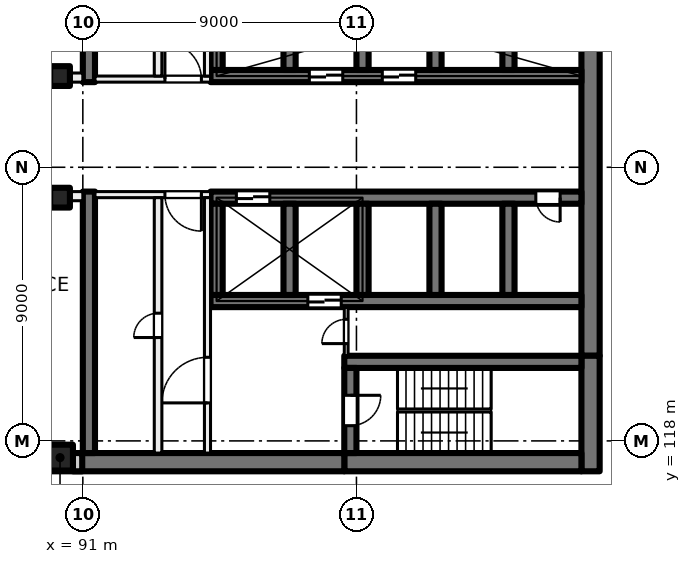
"""IFC4 building model, lengths in metres.
Left out: names, types, materials, properties, quantities, classifications, styles, units other than length and angle.
Written with IfcOpenShell. Run it as: python <this file> out.ifc"""

import sys

from ifc_helpers import new_model, si_unit, direction, frame, frame_2d, origin, origin_2d, place, context, subcontext, project, spatial, rectangle, extrude, element, fill, save


model = new_model("IFC4")
c1 = context("Model", 3, precision=1e-05, world=origin(), true_north=direction((0.0, 1.0)))
c2 = subcontext(c1, "Body", "Model", "MODEL_VIEW")
j1 = project(units=[si_unit("LENGTHUNIT", "METRE"), si_unit("PLANEANGLEUNIT", "RADIAN")], contexts=[c1])
p1 = place(None, origin())
s1 = spatial("IfcSite", under=j1, at=p1, CompositionType="ELEMENT")
p2 = place(p1, origin())
s2 = spatial("IfcBuilding", under=s1, at=p2, CompositionType="ELEMENT")
p3 = place(p2, frame((0.0, 0.0, 85.0)))
s3 = spatial("IfcBuildingStorey", under=s2, at=p3, CompositionType="ELEMENT", Elevation=85.0)
for number, where, z_axis, x_axis in (
    (1, (90.25, 130.0, 0.0), (0.0, 0.0, 1.0), (1.0, 0.0, 0.0)),
    (2, (90.25, 126.0, 0.0), (0.0, 0.0, 1.0), (1.0, 0.0, 0.0)),
):
    element("IfcColumn", number, at=place(p3, frame(where, z_axis=z_axis, x_axis=x_axis)), inside=s3, PredefinedType="COLUMN", context=c2, shape_type="SweptSolid", body=[
        extrude(rectangle(XDim=0.65, YDim=0.65, at=origin_2d()), origin(), (0.0, 0.0, 1.0), 4.0),
    ])
p4 = place(p3, frame((90.25, 117.45, 0.0), z_axis=(0.0, 0.0, 1.0), x_axis=(1.0, 0.0, 0.0)))
e3 = element("IfcColumn", 3, at=p4, inside=s3, PredefinedType="COLUMN", context=c2, shape_type="SweptSolid", body=[
    extrude(rectangle(XDim=0.85, YDim=0.85, at=origin_2d()), origin(), (0.0, 0.0, 1.0), 4.0),
])
p5 = place(p3, frame((107.7, 135.2, 0.0), z_axis=(0.0, 0.0, 1.0), x_axis=(0.0, -1.0, 0.0)))
e4 = element("IfcWall", 4, at=p5, inside=s3, PredefinedType="SHEAR", context=c2, shape_type="SweptSolid", body=[
    extrude(rectangle(XDim=14.4, YDim=0.6, at=frame_2d((7.2, 0.0))), origin(), (0.0, 0.0, 1.0), 4.0),
])
p6 = place(p3, frame((107.7, 120.8, 0.0), z_axis=(0.0, 0.0, 1.0), x_axis=(0.0, -1.0, 0.0)))
e5 = element("IfcWall", 5, at=p6, inside=s3, PredefinedType="SHEAR", context=c2, shape_type="SweptSolid", body=[
    extrude(rectangle(XDim=3.8, YDim=0.6, at=frame_2d((1.9, 0.0))), origin(), (0.0, 0.0, 1.0), 4.0),
])
p7 = place(p3, frame((107.4, 117.3, 0.0), z_axis=(0.0, 0.0, 1.0), x_axis=(-1.0, 0.0, 0.0)))
e6 = element("IfcWall", 6, at=p7, inside=s3, PredefinedType="SHEAR", context=c2, shape_type="SweptSolid", body=[
    extrude(rectangle(XDim=7.8, YDim=0.6, at=frame_2d((3.9, 0.0))), origin(), (0.0, 0.0, 1.0), 4.0),
])
p8 = place(p3, frame((99.6, 117.3, 0.0), z_axis=(0.0, 0.0, 1.0), x_axis=(-1.0, 0.0, 0.0)))
e7 = element("IfcWall", 7, at=p8, inside=s3, PredefinedType="SHEAR", context=c2, shape_type="SweptSolid", body=[
    extrude(rectangle(XDim=8.925, YDim=0.6, at=frame_2d((4.462, 0.0))), origin(), (0.0, 0.0, 1.0), 4.0),
])
p9 = place(p3, frame((107.4, 120.6, 0.0), z_axis=(0.0, 0.0, 1.0), x_axis=(-1.0, 0.0, 0.0)))
e8 = element("IfcWall", 8, at=p9, inside=s3, PredefinedType="SHEAR", context=c2, shape_type="SweptSolid", body=[
    extrude(rectangle(XDim=7.8, YDim=0.4, at=frame_2d((3.9, 0.0))), origin(), (0.0, 0.0, 1.0), 4.0),
])
p10 = place(p3, frame((99.8, 120.4, 0.0), z_axis=(0.0, 0.0, 1.0), x_axis=(0.0, -1.0, 0.0)))
e9 = element("IfcWall", 9, at=p10, inside=s3, PredefinedType="SHEAR", context=c2, shape_type="SweptSolid", body=[
    extrude(rectangle(XDim=2.8, YDim=0.4, at=frame_2d((1.4, 0.0))), origin(), (0.0, 0.0, 1.0), 4.0),
])
p11 = place(p10, frame((0.9, 0.0, 0.0)))
e10 = element("IfcOpeningElement", 10, at=p11, cuts=e9, PredefinedType="OPENING", context=c2, shape_type="SweptSolid", body=[
    extrude(rectangle(XDim=1.0, YDim=2.1, at=frame_2d((0.5, 1.05))), frame((0.0, 0.21, 0.0), z_axis=(0.0, -1.0, 0.0), x_axis=(1.0, 0.0, 0.0)), (0.0, 0.0, 1.0), 0.42),
])
p12 = place(p3, frame((107.4, 130.0, 0.0), z_axis=(0.0, 0.0, 1.0), x_axis=(-1.0, 0.0, 0.0)))
e11 = element("IfcWall", 11, at=p12, inside=s3, PredefinedType="SHEAR", context=c2, shape_type="SweptSolid", body=[
    extrude(rectangle(XDim=12.2, YDim=0.4, at=frame_2d((6.1, 0.0))), origin(), (0.0, 0.0, 1.0), 4.0),
])
p13 = place(p12, frame((5.45, 0.0, 0.0)))
e12 = element("IfcOpeningElement", 12, at=p13, cuts=e11, PredefinedType="OPENING", context=c2, shape_type="SweptSolid", body=[
    extrude(rectangle(XDim=1.1, YDim=2.1, at=frame_2d((0.55, 1.05))), frame((0.0, 0.21, 0.0), z_axis=(0.0, -1.0, 0.0), x_axis=(1.0, 0.0, 0.0)), (0.0, 0.0, 1.0), 0.42),
])
p14 = place(p12, frame((7.85, 0.0, 0.0)))
e13 = element("IfcOpeningElement", 13, at=p14, cuts=e11, PredefinedType="OPENING", context=c2, shape_type="SweptSolid", body=[
    extrude(rectangle(XDim=1.1, YDim=2.1, at=frame_2d((0.55, 1.05))), frame((0.0, 0.21, 0.0), z_axis=(0.0, -1.0, 0.0), x_axis=(1.0, 0.0, 0.0)), (0.0, 0.0, 1.0), 0.42),
])
for number, where, z_axis, x_axis in (
    (14, (105.0, 133.2, 0.0), (0.0, 0.0, 1.0), (0.0, -1.0, 0.0)),
    (15, (102.6, 133.2, 0.0), (0.0, 0.0, 1.0), (0.0, -1.0, 0.0)),
    (16, (100.2, 133.2, 0.0), (0.0, 0.0, 1.0), (0.0, -1.0, 0.0)),
    (17, (97.8, 133.2, 0.0), (0.0, 0.0, 1.0), (0.0, -1.0, 0.0)),
    (18, (95.4, 133.2, 0.0), (0.0, 0.0, 1.0), (0.0, -1.0, 0.0)),
):
    element("IfcWall", number, at=place(p3, frame(where, z_axis=z_axis, x_axis=x_axis)), inside=s3, PredefinedType="SHEAR", context=c2, shape_type="SweptSolid", body=[
        extrude(rectangle(XDim=3.0, YDim=0.4, at=frame_2d((1.5, 0.0))), origin(), (0.0, 0.0, 1.0), 4.0),
    ])
p15 = place(p3, frame((107.4, 126.0, 0.0), z_axis=(0.0, 0.0, 1.0), x_axis=(-1.0, 0.0, 0.0)))
e19 = element("IfcWall", 19, at=p15, inside=s3, PredefinedType="SHEAR", context=c2, shape_type="SweptSolid", body=[
    extrude(rectangle(XDim=12.2, YDim=0.4, at=frame_2d((6.1, 0.0))), origin(), (0.0, 0.0, 1.0), 4.0),
])
p16 = place(p15, frame((10.25, 0.0, 0.0)))
e20 = element("IfcOpeningElement", 20, at=p16, cuts=e19, PredefinedType="OPENING", context=c2, shape_type="SweptSolid", body=[
    extrude(rectangle(XDim=1.1, YDim=2.1, at=frame_2d((0.55, 1.05))), frame((0.0, 0.21, 0.0), z_axis=(0.0, -1.0, 0.0), x_axis=(1.0, 0.0, 0.0)), (0.0, 0.0, 1.0), 0.42),
])
p17 = place(p15, frame((0.7, 0.0, 0.0)))
e21 = element("IfcOpeningElement", 21, at=p17, cuts=e19, PredefinedType="OPENING", context=c2, shape_type="SweptSolid", body=[
    extrude(rectangle(XDim=0.8, YDim=2.1, at=frame_2d((0.4, 1.05))), frame((0.0, 0.21, 0.0), z_axis=(0.0, -1.0, 0.0), x_axis=(1.0, 0.0, 0.0)), (0.0, 0.0, 1.0), 0.42),
])
p18 = place(p3, frame((107.4, 122.6, 0.0), z_axis=(0.0, 0.0, 1.0), x_axis=(-1.0, 0.0, 0.0)))
e22 = element("IfcWall", 22, at=p18, inside=s3, PredefinedType="SHEAR", context=c2, shape_type="SweptSolid", body=[
    extrude(rectangle(XDim=12.2, YDim=0.4, at=frame_2d((6.1, 0.0))), origin(), (0.0, 0.0, 1.0), 4.0),
])
p19 = place(p18, frame((7.9, 0.0, 0.0)))
e23 = element("IfcOpeningElement", 23, at=p19, cuts=e22, PredefinedType="OPENING", context=c2, shape_type="SweptSolid", body=[
    extrude(rectangle(XDim=1.1, YDim=2.1, at=frame_2d((0.55, 1.05))), frame((0.0, 0.21, 0.0), z_axis=(0.0, -1.0, 0.0), x_axis=(1.0, 0.0, 0.0)), (0.0, 0.0, 1.0), 0.42),
])
for number, where, z_axis, x_axis in (
    (24, (105.0, 125.8, 0.0), (0.0, 0.0, 1.0), (0.0, -1.0, 0.0)),
    (25, (102.6, 125.8, 0.0), (0.0, 0.0, 1.0), (0.0, -1.0, 0.0)),
    (26, (100.2, 125.8, 0.0), (0.0, 0.0, 1.0), (0.0, -1.0, 0.0)),
    (27, (97.8, 125.8, 0.0), (0.0, 0.0, 1.0), (0.0, -1.0, 0.0)),
    (28, (95.4, 125.8, 0.0), (0.0, 0.0, 1.0), (0.0, -1.0, 0.0)),
):
    element("IfcWall", number, at=place(p3, frame(where, z_axis=z_axis, x_axis=x_axis)), inside=s3, PredefinedType="SHEAR", context=c2, shape_type="SweptSolid", body=[
        extrude(rectangle(XDim=3.0, YDim=0.4, at=frame_2d((1.5, 0.0))), origin(), (0.0, 0.0, 1.0), 4.0),
    ])
for number, where, z_axis, x_axis in (
    (29, (91.2, 138.4, 0.0), (0.0, 0.0, 1.0), (0.0, -1.0, 0.0)),
    (30, (91.2, 126.2, 0.0), (0.0, 0.0, 1.0), (0.0, -1.0, 0.0)),
):
    element("IfcWall", number, at=place(p3, frame(where, z_axis=z_axis, x_axis=x_axis)), inside=s3, PredefinedType="SHEAR", context=c2, shape_type="SweptSolid", body=[
        extrude(rectangle(XDim=8.6, YDim=0.4, at=frame_2d((4.3, 0.0))), origin(), (0.0, 0.0, 1.0), 4.0),
    ])
p20 = place(p3, frame((90.98, 117.3, 0.0), z_axis=(0.0, 0.0, 1.0), x_axis=(-1.0, 0.0, 0.0)))
e31 = element("IfcWall", 31, at=p20, inside=s3, PredefinedType="SOLIDWALL", context=c2, shape_type="SweptSolid", body=[
    extrude(rectangle(XDim=33.745, YDim=0.6, at=frame_2d((16.873, 0.0))), origin(), (0.0, 0.0, 1.0), 3.625),
])
p21 = place(p20, frame((1.48, 0.0, 0.9)))
e32 = element("IfcOpeningElement", 32, at=p21, cuts=e31, PredefinedType="OPENING", context=c2, shape_type="SweptSolid", body=[
    extrude(rectangle(XDim=3.0, YDim=2.4, at=frame_2d((1.5, 1.2))), frame((0.0, 0.31, 0.0), z_axis=(0.0, -1.0, 0.0), x_axis=(1.0, 0.0, 0.0)), (0.0, 0.0, 1.0), 0.62),
])
p22 = place(p20, frame((5.98, 0.0, 0.9)))
e33 = element("IfcOpeningElement", 33, at=p22, cuts=e31, PredefinedType="OPENING", context=c2, shape_type="SweptSolid", body=[
    extrude(rectangle(XDim=3.0, YDim=2.4, at=frame_2d((1.5, 1.2))), frame((0.0, 0.31, 0.0), z_axis=(0.0, -1.0, 0.0), x_axis=(1.0, 0.0, 0.0)), (0.0, 0.0, 1.0), 0.62),
])
p23 = place(p20, frame((10.48, 0.0, 0.9)))
e34 = element("IfcOpeningElement", 34, at=p23, cuts=e31, PredefinedType="OPENING", context=c2, shape_type="SweptSolid", body=[
    extrude(rectangle(XDim=3.0, YDim=2.4, at=frame_2d((1.5, 1.2))), frame((0.0, 0.31, 0.0), z_axis=(0.0, -1.0, 0.0), x_axis=(1.0, 0.0, 0.0)), (0.0, 0.0, 1.0), 0.62),
])
p24 = place(p20, frame((14.98, 0.0, 0.9)))
e35 = element("IfcOpeningElement", 35, at=p24, cuts=e31, PredefinedType="OPENING", context=c2, shape_type="SweptSolid", body=[
    extrude(rectangle(XDim=3.0, YDim=2.4, at=frame_2d((1.5, 1.2))), frame((0.0, 0.31, 0.0), z_axis=(0.0, -1.0, 0.0), x_axis=(1.0, 0.0, 0.0)), (0.0, 0.0, 1.0), 0.62),
])
p25 = place(p20, frame((19.48, 0.0, 0.9)))
e36 = element("IfcOpeningElement", 36, at=p25, cuts=e31, PredefinedType="OPENING", context=c2, shape_type="SweptSolid", body=[
    extrude(rectangle(XDim=3.0, YDim=2.4, at=frame_2d((1.5, 1.2))), frame((0.0, 0.31, 0.0), z_axis=(0.0, -1.0, 0.0), x_axis=(1.0, 0.0, 0.0)), (0.0, 0.0, 1.0), 0.62),
])
p26 = place(p20, frame((23.98, 0.0, 0.9)))
e37 = element("IfcOpeningElement", 37, at=p26, cuts=e31, PredefinedType="OPENING", context=c2, shape_type="SweptSolid", body=[
    extrude(rectangle(XDim=3.0, YDim=2.4, at=frame_2d((1.5, 1.2))), frame((0.0, 0.31, 0.0), z_axis=(0.0, -1.0, 0.0), x_axis=(1.0, 0.0, 0.0)), (0.0, 0.0, 1.0), 0.62),
])
p27 = place(p20, frame((28.48, 0.0, 0.9)))
e38 = element("IfcOpeningElement", 38, at=p27, cuts=e31, PredefinedType="OPENING", context=c2, shape_type="SweptSolid", body=[
    extrude(rectangle(XDim=3.0, YDim=2.4, at=frame_2d((1.5, 1.2))), frame((0.0, 0.31, 0.0), z_axis=(0.0, -1.0, 0.0), x_axis=(1.0, 0.0, 0.0)), (0.0, 0.0, 1.0), 0.62),
])
p28 = place(p3, frame((95.2, 126.1, 0.0), z_axis=(0.0, 0.0, 1.0), x_axis=(-1.0, 0.0, 0.0)))
e39 = element("IfcWall", 39, at=p28, inside=s3, PredefinedType="PARTITIONING", context=c2, shape_type="SweptSolid", body=[
    extrude(rectangle(XDim=3.8, YDim=0.2, at=frame_2d((1.9, 0.0))), origin(), (0.0, 0.0, 1.0), 3.625),
])
p29 = place(p28, frame((0.3, 0.0, 0.0)))
e40 = element("IfcOpeningElement", 40, at=p29, cuts=e39, PredefinedType="OPENING", context=c2, shape_type="SweptSolid", body=[
    extrude(rectangle(XDim=1.2, YDim=2.1, at=frame_2d((0.6, 1.05))), frame((0.0, 0.11, 0.0), z_axis=(0.0, -1.0, 0.0), x_axis=(1.0, 0.0, 0.0)), (0.0, 0.0, 1.0), 0.22),
])
p30 = place(p3, frame((95.1, 117.6, 0.0), z_axis=(0.0, 0.0, 1.0), x_axis=(0.0, 1.0, 0.0)))
e41 = element("IfcWall", 41, at=p30, inside=s3, PredefinedType="PARTITIONING", context=c2, shape_type="SweptSolid", body=[
    extrude(rectangle(XDim=8.4, YDim=0.2, at=frame_2d((4.2, 0.0))), origin(), (0.0, 0.0, 1.0), 3.625),
])
p31 = place(p30, frame((1.65, 0.0, 0.0)))
e42 = element("IfcOpeningElement", 42, at=p31, cuts=e41, PredefinedType="OPENING", context=c2, shape_type="SweptSolid", body=[
    extrude(rectangle(XDim=1.5, YDim=2.1, at=frame_2d((0.75, 1.05))), frame((0.0, 0.11, 0.0), z_axis=(0.0, -1.0, 0.0), x_axis=(1.0, 0.0, 0.0)), (0.0, 0.0, 1.0), 0.22),
])
p32 = place(p3, frame((93.475, 117.6, 0.0), z_axis=(0.0, 0.0, 1.0), x_axis=(0.0, 1.0, 0.0)))
e43 = element("IfcWall", 43, at=p32, inside=s3, PredefinedType="PARTITIONING", context=c2, shape_type="SweptSolid", body=[
    extrude(rectangle(XDim=8.4, YDim=0.25, at=frame_2d((4.2, 0.0))), origin(), (0.0, 0.0, 1.0), 3.625),
])
p33 = place(p32, frame((3.8, 0.0, 0.0)))
e44 = element("IfcOpeningElement", 44, at=p33, cuts=e43, PredefinedType="OPENING", context=c2, shape_type="SweptSolid", body=[
    extrude(rectangle(XDim=0.8, YDim=2.1, at=frame_2d((0.4, 1.05))), frame((0.0, 0.135, 0.0), z_axis=(0.0, -1.0, 0.0), x_axis=(1.0, 0.0, 0.0)), (0.0, 0.0, 1.0), 0.27),
])
p34 = place(p3, frame((99.663, 120.8, 0.0), z_axis=(0.0, 0.0, 1.0), x_axis=(0.0, 1.0, 0.0)))
e45 = element("IfcWall", 45, at=p34, inside=s3, PredefinedType="PARTITIONING", context=c2, shape_type="SweptSolid", body=[
    extrude(rectangle(XDim=1.6, YDim=0.125, at=frame_2d((0.8, 0.0))), origin(), (0.0, 0.0, 1.0), 3.625),
])
p35 = place(p34, frame((0.4, 0.0, 0.0)))
e46 = element("IfcOpeningElement", 46, at=p35, cuts=e45, PredefinedType="OPENING", context=c2, shape_type="SweptSolid", body=[
    extrude(rectangle(XDim=0.8, YDim=2.1, at=frame_2d((0.4, 1.05))), frame((0.0, 0.073, 0.0), z_axis=(0.0, -1.0, 0.0), x_axis=(1.0, 0.0, 0.0)), (0.0, 0.0, 1.0), 0.145),
])
p36 = place(p3, frame((91.4, 129.9, 0.0), z_axis=(0.0, 0.0, 1.0), x_axis=(1.0, 0.0, 0.0)))
e47 = element("IfcWall", 47, at=p36, inside=s3, PredefinedType="PARTITIONING", context=c2, shape_type="SweptSolid", body=[
    extrude(rectangle(XDim=3.8, YDim=0.2, at=frame_2d((1.9, 0.0))), origin(), (0.0, 0.0, 1.0), 3.625),
])
p37 = place(p36, frame((2.3, 0.0, 0.0)))
e48 = element("IfcOpeningElement", 48, at=p37, cuts=e47, PredefinedType="OPENING", context=c2, shape_type="SweptSolid", body=[
    extrude(rectangle(XDim=1.2, YDim=2.1, at=frame_2d((0.6, 1.05))), frame((0.0, 0.11, 0.0), z_axis=(0.0, -1.0, 0.0), x_axis=(1.0, 0.0, 0.0)), (0.0, 0.0, 1.0), 0.22),
])
p38 = place(p3, frame((95.1, 130.0, 0.0), z_axis=(0.0, 0.0, 1.0), x_axis=(0.0, 1.0, 0.0)))
e49 = element("IfcWall", 49, at=p38, inside=s3, PredefinedType="PARTITIONING", context=c2, shape_type="SweptSolid", body=[
    extrude(rectangle(XDim=8.4, YDim=0.2, at=frame_2d((4.2, 0.0))), origin(), (0.0, 0.0, 1.0), 3.625),
])
p39 = place(p38, frame((5.25, 0.0, 0.0)))
e50 = element("IfcOpeningElement", 50, at=p39, cuts=e49, PredefinedType="OPENING", context=c2, shape_type="SweptSolid", body=[
    extrude(rectangle(XDim=1.5, YDim=2.1, at=frame_2d((0.75, 1.05))), frame((0.0, 0.11, 0.0), z_axis=(0.0, -1.0, 0.0), x_axis=(1.0, 0.0, 0.0)), (0.0, 0.0, 1.0), 0.22),
])
p40 = place(p3, frame((93.475, 130.0, 0.0), z_axis=(0.0, 0.0, 1.0), x_axis=(0.0, 1.0, 0.0)))
e51 = element("IfcWall", 51, at=p40, inside=s3, PredefinedType="PARTITIONING", context=c2, shape_type="SweptSolid", body=[
    extrude(rectangle(XDim=8.4, YDim=0.25, at=frame_2d((4.2, 0.0))), origin(), (0.0, 0.0, 1.0), 3.625),
])
p41 = place(p40, frame((3.8, 0.0, 0.0)))
e52 = element("IfcOpeningElement", 52, at=p41, cuts=e51, PredefinedType="OPENING", context=c2, shape_type="SweptSolid", body=[
    extrude(rectangle(XDim=0.8, YDim=2.1, at=frame_2d((0.4, 1.05))), frame((0.0, 0.135, 0.0), z_axis=(0.0, -1.0, 0.0), x_axis=(1.0, 0.0, 0.0)), (0.0, 0.0, 1.0), 0.27),
])
p42 = place(p3, frame((72.5, 129.95, 0.0), z_axis=(0.0, 0.0, 1.0), x_axis=(1.0, 0.0, 0.0)))
e53 = element("IfcWall", 53, at=p42, inside=s3, PredefinedType="PARTITIONING", context=c2, shape_type="SweptSolid", body=[
    extrude(rectangle(XDim=18.5, YDim=0.3, at=frame_2d((9.25, 0.0))), origin(), (0.0, 0.0, 1.0), 3.625),
])
p43 = place(p42, frame((9.35, 0.0, 0.0)))
e54 = element("IfcOpeningElement", 54, at=p43, cuts=e53, PredefinedType="OPENING", context=c2, shape_type="SweptSolid", body=[
    extrude(rectangle(XDim=1.8, YDim=2.1, at=frame_2d((0.9, 1.05))), frame((0.0, 0.16, 0.0), z_axis=(0.0, -1.0, 0.0), x_axis=(1.0, 0.0, 0.0)), (0.0, 0.0, 1.0), 0.32),
])
p44 = place(p3, frame((91.0, 126.05, 0.0), z_axis=(0.0, 0.0, 1.0), x_axis=(-1.0, 0.0, 0.0)))
e55 = element("IfcWall", 55, at=p44, inside=s3, PredefinedType="PARTITIONING", context=c2, shape_type="SweptSolid", body=[
    extrude(rectangle(XDim=43.785, YDim=0.3, at=frame_2d((21.893, 0.0))), origin(), (0.0, 0.0, 1.0), 3.625),
])
p45 = place(p44, frame((7.475, 0.0, 0.0)))
e56 = element("IfcOpeningElement", 56, at=p45, cuts=e55, PredefinedType="OPENING", context=c2, shape_type="SweptSolid", body=[
    extrude(rectangle(XDim=1.8, YDim=2.1, at=frame_2d((0.9, 1.05))), frame((0.0, 0.16, 0.0), z_axis=(0.0, -1.0, 0.0), x_axis=(1.0, 0.0, 0.0)), (0.0, 0.0, 1.0), 0.32),
])
p46 = place(p44, frame((34.0, 0.0, 0.0)))
e57 = element("IfcOpeningElement", 57, at=p46, cuts=e55, PredefinedType="OPENING", context=c2, shape_type="SweptSolid", body=[
    extrude(rectangle(XDim=1.0, YDim=2.1, at=frame_2d((0.5, 1.05))), frame((0.0, 0.16, 0.0), z_axis=(0.0, -1.0, 0.0), x_axis=(1.0, 0.0, 0.0)), (0.0, 0.0, 1.0), 0.32),
])
p47 = place(p44, frame((39.296, 0.0, 0.0)))
e58 = element("IfcOpeningElement", 58, at=p47, cuts=e55, PredefinedType="OPENING", context=c2, shape_type="SweptSolid", body=[
    extrude(rectangle(XDim=1.8, YDim=2.1, at=frame_2d((0.9, 1.05))), frame((0.0, 0.16, 0.0), z_axis=(0.0, -1.0, 0.0), x_axis=(1.0, 0.0, 0.0)), (0.0, 0.0, 1.0), 0.32),
])
p48 = place(p16, origin())
e59 = element("IfcDoor", 59, at=p48, inside=s3, OperationType="DOUBLE_DOOR_SLIDING", PredefinedType="DOOR", context=c2, shape_type="SweptSolid", body=[
    extrude(rectangle(XDim=1.1, YDim=2.1, at=frame_2d((0.55, 1.05))), frame((0.0, 0.025, 0.0), z_axis=(0.0, -1.0, 0.0), x_axis=(1.0, 0.0, 0.0)), (0.0, 0.0, 1.0), 0.05),
])
fill(e20, e59)
p49 = place(p13, origin())
e60 = element("IfcDoor", 60, at=p49, inside=s3, OperationType="DOUBLE_DOOR_SLIDING", PredefinedType="DOOR", context=c2, shape_type="SweptSolid", body=[
    extrude(rectangle(XDim=1.1, YDim=2.1, at=frame_2d((0.55, 1.05))), frame((0.0, 0.025, 0.0), z_axis=(0.0, -1.0, 0.0), x_axis=(1.0, 0.0, 0.0)), (0.0, 0.0, 1.0), 0.05),
])
fill(e12, e60)
p50 = place(p14, origin())
e61 = element("IfcDoor", 61, at=p50, inside=s3, OperationType="DOUBLE_DOOR_SLIDING", PredefinedType="DOOR", context=c2, shape_type="SweptSolid", body=[
    extrude(rectangle(XDim=1.1, YDim=2.1, at=frame_2d((0.55, 1.05))), frame((0.0, 0.025, 0.0), z_axis=(0.0, -1.0, 0.0), x_axis=(1.0, 0.0, 0.0)), (0.0, 0.0, 1.0), 0.05),
])
fill(e13, e61)
p51 = place(p17, origin())
e62 = element("IfcDoor", 62, at=p51, inside=s3, OperationType="SINGLE_SWING_LEFT", PredefinedType="DOOR", context=c2, shape_type="SweptSolid", body=[
    extrude(rectangle(XDim=0.8, YDim=2.1, at=frame_2d((0.4, 1.05))), frame((0.0, 0.025, 0.0), z_axis=(0.0, -1.0, 0.0), x_axis=(1.0, 0.0, 0.0)), (0.0, 0.0, 1.0), 0.05),
])
fill(e21, e62)
p52 = place(p29, origin())
e63 = element("IfcDoor", 63, at=p52, inside=s3, OperationType="DOUBLE_DOOR_SINGLE_SWING", PredefinedType="DOOR", context=c2, shape_type="SweptSolid", body=[
    extrude(rectangle(XDim=1.2, YDim=2.1, at=frame_2d((0.6, 1.05))), frame((0.0, 0.025, 0.0), z_axis=(0.0, -1.0, 0.0), x_axis=(1.0, 0.0, 0.0)), (0.0, 0.0, 1.0), 0.05),
])
fill(e40, e63)
p53 = place(p31, origin())
e64 = element("IfcDoor", 64, at=p53, inside=s3, OperationType="DOUBLE_DOOR_SINGLE_SWING", PredefinedType="DOOR", context=c2, shape_type="SweptSolid", body=[
    extrude(rectangle(XDim=1.5, YDim=2.1, at=frame_2d((0.75, 1.05))), frame((0.0, 0.025, 0.0), z_axis=(0.0, -1.0, 0.0), x_axis=(1.0, 0.0, 0.0)), (0.0, 0.0, 1.0), 0.05),
])
fill(e42, e64)
p54 = place(p11, origin())
e65 = element("IfcDoor", 65, at=p54, inside=s3, OperationType="SINGLE_SWING_LEFT", PredefinedType="DOOR", context=c2, shape_type="SweptSolid", body=[
    extrude(rectangle(XDim=1.0, YDim=2.1, at=frame_2d((0.5, 1.05))), frame((0.0, 0.025, 0.0), z_axis=(0.0, -1.0, 0.0), x_axis=(1.0, 0.0, 0.0)), (0.0, 0.0, 1.0), 0.05),
])
fill(e10, e65)
p55 = place(p35, origin())
e66 = element("IfcDoor", 66, at=p55, inside=s3, OperationType="SINGLE_SWING_RIGHT", PredefinedType="DOOR", context=c2, shape_type="SweptSolid", body=[
    extrude(rectangle(XDim=0.8, YDim=2.1, at=frame_2d((0.4, 1.05))), frame((0.0, 0.025, 0.0), z_axis=(0.0, -1.0, 0.0), x_axis=(1.0, 0.0, 0.0)), (0.0, 0.0, 1.0), 0.05),
])
fill(e46, e66)
p56 = place(p33, origin())
e67 = element("IfcDoor", 67, at=p56, inside=s3, OperationType="SINGLE_SWING_LEFT", PredefinedType="DOOR", context=c2, shape_type="SweptSolid", body=[
    extrude(rectangle(XDim=0.8, YDim=2.1, at=frame_2d((0.4, 1.05))), frame((0.0, 0.025, 0.0), z_axis=(0.0, -1.0, 0.0), x_axis=(1.0, 0.0, 0.0)), (0.0, 0.0, 1.0), 0.05),
])
fill(e44, e67)
p57 = place(p37, origin())
e68 = element("IfcDoor", 68, at=p57, inside=s3, OperationType="DOUBLE_DOOR_SINGLE_SWING", PredefinedType="DOOR", context=c2, shape_type="SweptSolid", body=[
    extrude(rectangle(XDim=1.2, YDim=2.1, at=frame_2d((0.6, 1.05))), frame((0.0, 0.025, 0.0), z_axis=(0.0, -1.0, 0.0), x_axis=(1.0, 0.0, 0.0)), (0.0, 0.0, 1.0), 0.05),
])
fill(e48, e68)
p58 = place(p19, origin())
e69 = element("IfcDoor", 69, at=p58, inside=s3, OperationType="DOUBLE_DOOR_SLIDING", PredefinedType="DOOR", context=c2, shape_type="SweptSolid", body=[
    extrude(rectangle(XDim=1.1, YDim=2.1, at=frame_2d((0.55, 1.05))), frame((0.0, 0.025, 0.0), z_axis=(0.0, -1.0, 0.0), x_axis=(1.0, 0.0, 0.0)), (0.0, 0.0, 1.0), 0.05),
])
fill(e23, e69)
save(model, sys.argv[1])
